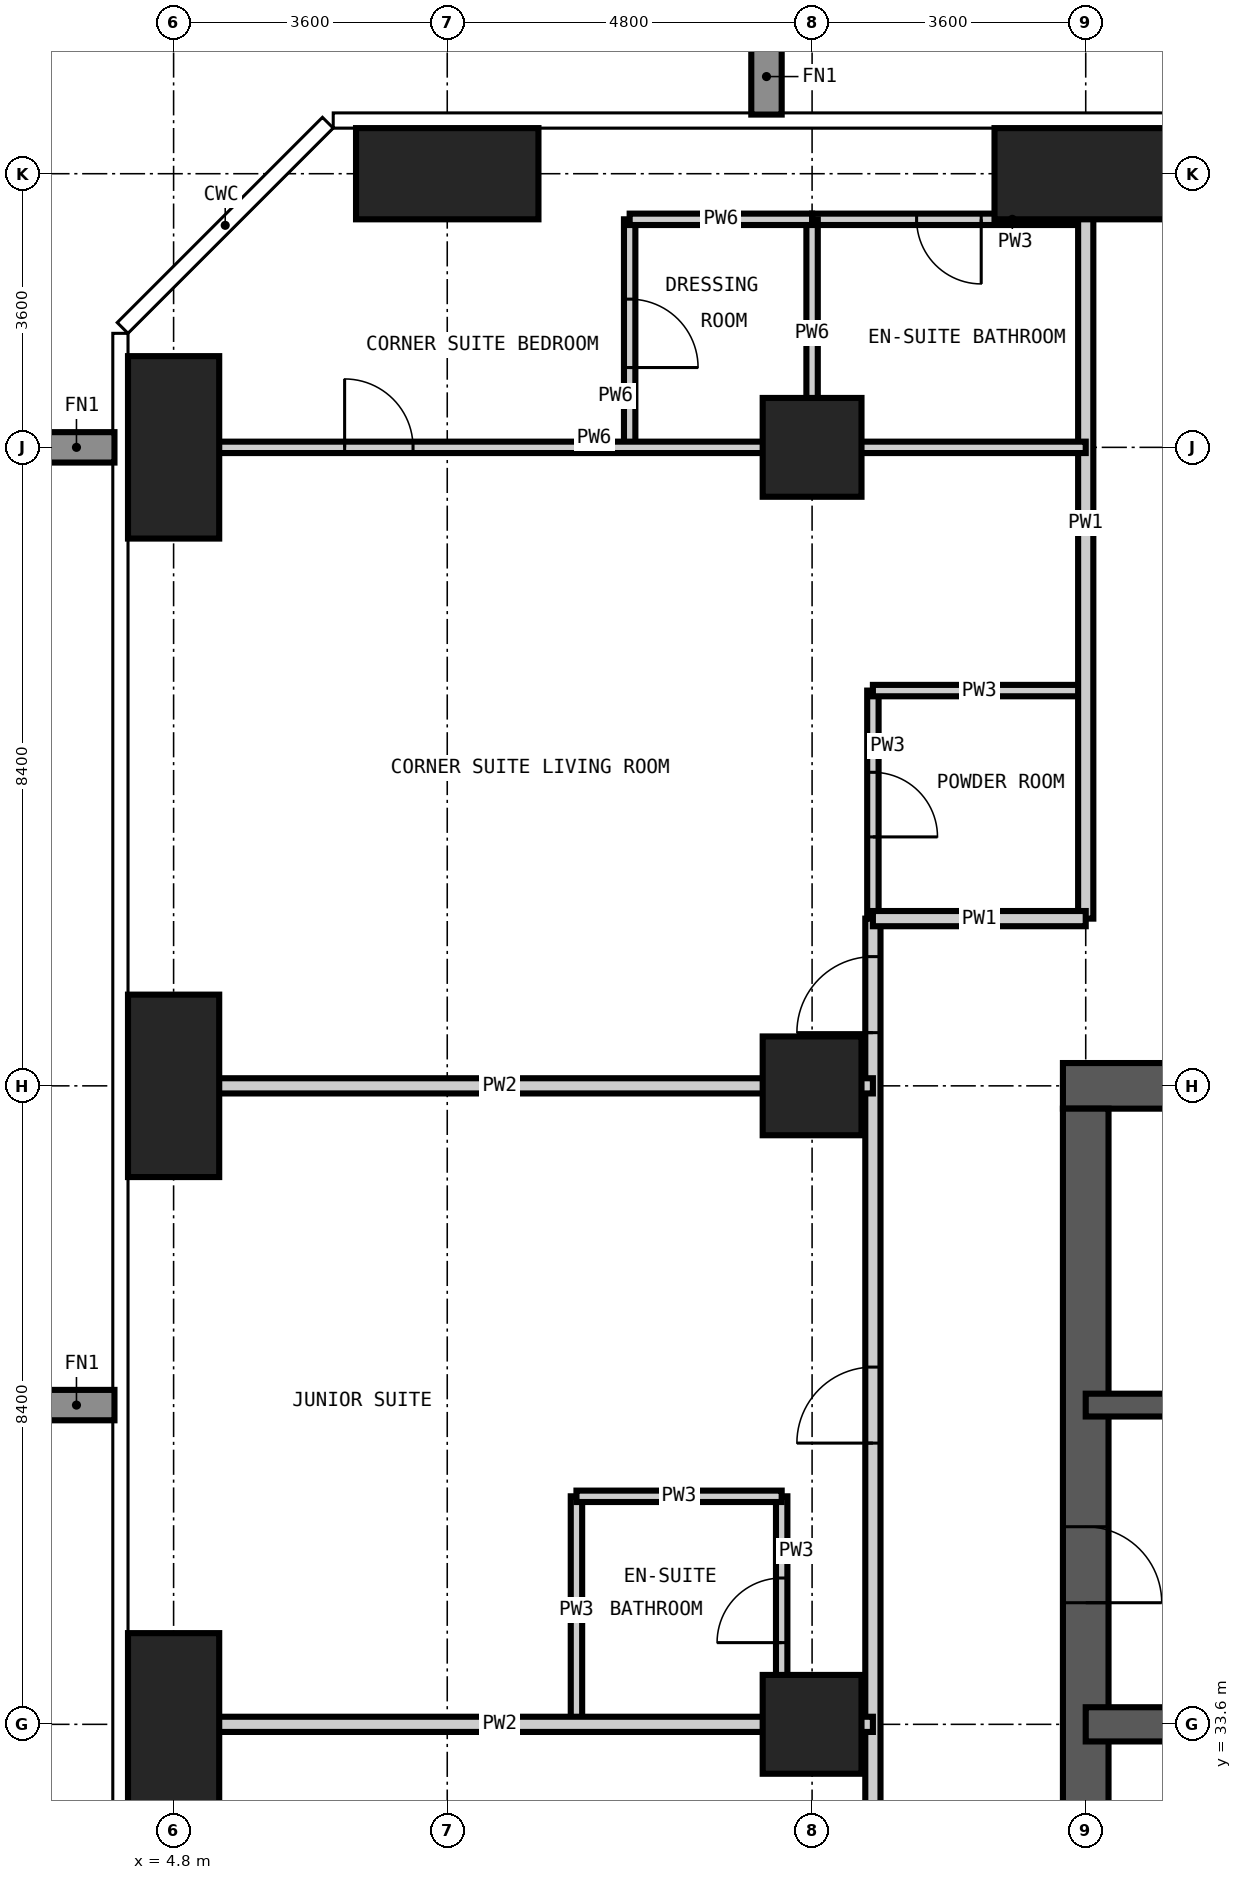
"""IFC4 building model, lengths in metres.
Left out: names, types, materials, properties, quantities, classifications, styles, units other than length and angle.
Written with IfcOpenShell. Run it as: python <this file> out.ifc"""

import sys

from ifc_helpers import new_model, si_unit, direction, frame, frame_2d, origin, origin_2d, place, context, subcontext, project, spatial, rectangle, extrude, element, fill, save


model = new_model("IFC4")
c1 = context("Model", 3, precision=1e-05, world=origin(), true_north=direction((0.0, 1.0)))
c2 = subcontext(c1, "Body", "Model", "MODEL_VIEW")
j1 = project(units=[si_unit("LENGTHUNIT", "METRE"), si_unit("PLANEANGLEUNIT", "RADIAN")], contexts=[c1])
p1 = place(None, origin())
s1 = spatial("IfcSite", under=j1, at=p1, CompositionType="ELEMENT")
p2 = place(p1, origin())
s2 = spatial("IfcBuilding", under=s1, at=p2, CompositionType="ELEMENT")
p3 = place(p2, frame((0.0, 0.0, 187.8)))
s3 = spatial("IfcBuildingStorey", under=s2, at=p3, CompositionType="ELEMENT", Elevation=187.8)
for number, where, z_axis, x_axis in (
    (1, (4.8, 33.6, -0.35), (0.0, 0.0, 1.0), (1.0, 0.0, 0.0)),
    (2, (4.8, 42.0, -0.35), (0.0, 0.0, 1.0), (1.0, 0.0, 0.0)),
    (3, (4.8, 50.4, -0.35), (0.0, 0.0, 1.0), (1.0, 0.0, 0.0)),
):
    element("IfcColumn", number, at=place(p3, frame(where, z_axis=z_axis, x_axis=x_axis)), inside=s3, PredefinedType="COLUMN", context=c2, shape_type="SweptSolid", body=[
        extrude(rectangle(XDim=1.2, YDim=2.4, at=origin_2d()), origin(), (0.0, 0.0, 1.0), 3.6),
    ])
p4 = place(p3, frame((8.4, 54.0, -0.35), z_axis=(0.0, 0.0, 1.0), x_axis=(1.0, 0.0, 0.0)))
e4 = element("IfcColumn", 4, at=p4, inside=s3, PredefinedType="COLUMN", context=c2, shape_type="SweptSolid", body=[
    extrude(rectangle(XDim=2.4, YDim=1.2, at=origin_2d()), origin(), (0.0, 0.0, 1.0), 3.6),
])
for number, where, z_axis, x_axis in (
    (5, (13.2, 33.6, -0.35), (0.0, 0.0, 1.0), (1.0, 0.0, 0.0)),
    (6, (13.2, 42.0, -0.35), (0.0, 0.0, 1.0), (1.0, 0.0, 0.0)),
    (7, (13.2, 50.4, -0.35), (0.0, 0.0, 1.0), (1.0, 0.0, 0.0)),
):
    element("IfcColumn", number, at=place(p3, frame(where, z_axis=z_axis, x_axis=x_axis)), inside=s3, PredefinedType="COLUMN", context=c2, shape_type="SweptSolid", body=[
        extrude(rectangle(XDim=1.3, YDim=1.3, at=origin_2d()), origin(), (0.0, 0.0, 1.0), 3.6),
    ])
p5 = place(p3, frame((16.8, 54.0, -0.35), z_axis=(0.0, 0.0, 1.0), x_axis=(1.0, 0.0, 0.0)))
e8 = element("IfcColumn", 8, at=p5, inside=s3, PredefinedType="COLUMN", context=c2, shape_type="SweptSolid", body=[
    extrude(rectangle(XDim=2.4, YDim=1.2, at=origin_2d()), origin(), (0.0, 0.0, 1.0), 3.6),
])
p6 = place(p3, frame((42.3, 42.0, -0.35), z_axis=(0.0, 0.0, 1.0), x_axis=(-1.0, 0.0, 0.0)))
e9 = element("IfcWall", 9, at=p6, inside=s3, PredefinedType="SHEAR", context=c2, shape_type="SweptSolid", body=[
    extrude(rectangle(XDim=25.8, YDim=0.6, at=frame_2d((12.9, 0.0))), origin(), (0.0, 0.0, 1.0), 3.6),
])
p7 = place(p6, frame((20.8, 0.0, 0.35)))
e10 = element("IfcOpeningElement", 10, at=p7, cuts=e9, PredefinedType="OPENING", context=c2, shape_type="SweptSolid", body=[
    extrude(rectangle(XDim=1.0, YDim=2.1, at=frame_2d((0.5, 1.05))), frame((0.0, 0.31, 0.0), z_axis=(0.0, -1.0, 0.0), x_axis=(1.0, 0.0, 0.0)), (0.0, 0.0, 1.0), 0.62),
])
p8 = place(p6, frame((10.2, 0.0, 0.35)))
e11 = element("IfcOpeningElement", 11, at=p8, cuts=e9, PredefinedType="OPENING", context=c2, shape_type="SweptSolid", body=[
    extrude(rectangle(XDim=1.2, YDim=2.2, at=frame_2d((0.6, 1.1))), frame((0.0, 0.31, 0.0), z_axis=(0.0, -1.0, 0.0), x_axis=(1.0, 0.0, 0.0)), (0.0, 0.0, 1.0), 0.62),
])
p9 = place(p3, frame((16.8, 41.7, -0.35), z_axis=(0.0, 0.0, 1.0), x_axis=(0.0, -1.0, 0.0)))
e12 = element("IfcWall", 12, at=p9, inside=s3, PredefinedType="SHEAR", context=c2, shape_type="SweptSolid", body=[
    extrude(rectangle(XDim=24.6, YDim=0.6, at=frame_2d((12.3, 0.0))), origin(), (0.0, 0.0, 1.0), 3.6),
])
p10 = place(p9, frame((11.4, 0.0, 0.35)))
e13 = element("IfcOpeningElement", 13, at=p10, cuts=e12, PredefinedType="OPENING", context=c2, shape_type="SweptSolid", body=[
    extrude(rectangle(XDim=1.8, YDim=2.2, at=frame_2d((0.9, 1.1))), frame((0.0, 0.31, 0.0), z_axis=(0.0, -1.0, 0.0), x_axis=(1.0, 0.0, 0.0)), (0.0, 0.0, 1.0), 0.62),
])
p11 = place(p9, frame((20.2, 0.0, 0.35)))
e14 = element("IfcOpeningElement", 14, at=p11, cuts=e12, PredefinedType="OPENING", context=c2, shape_type="SweptSolid", body=[
    extrude(rectangle(XDim=1.0, YDim=2.1, at=frame_2d((0.5, 1.05))), frame((0.0, 0.31, 0.0), z_axis=(0.0, -1.0, 0.0), x_axis=(1.0, 0.0, 0.0)), (0.0, 0.0, 1.0), 0.62),
])
p12 = place(p9, frame((5.5, 0.0, 0.35)))
e15 = element("IfcOpeningElement", 15, at=p12, cuts=e12, PredefinedType="OPENING", context=c2, shape_type="SweptSolid", body=[
    extrude(rectangle(XDim=1.0, YDim=2.1, at=frame_2d((0.5, 1.05))), frame((0.0, 0.31, 0.0), z_axis=(0.0, -1.0, 0.0), x_axis=(1.0, 0.0, 0.0)), (0.0, 0.0, 1.0), 0.62),
])
p13 = place(p3, frame((16.8, 37.8, -0.35), z_axis=(0.0, 0.0, 1.0), x_axis=(1.0, 0.0, 0.0)))
e16 = element("IfcWall", 16, at=p13, inside=s3, PredefinedType="SHEAR", context=c2, shape_type="SweptSolid", body=[
    extrude(rectangle(XDim=8.4, YDim=0.3, at=frame_2d((4.2, 0.0))), origin(), (0.0, 0.0, 1.0), 3.6),
])
p14 = place(p3, frame((16.8, 33.6, -0.35), z_axis=(0.0, 0.0, 1.0), x_axis=(1.0, 0.0, 0.0)))
e17 = element("IfcWall", 17, at=p14, inside=s3, PredefinedType="SHEAR", context=c2, shape_type="SweptSolid", body=[
    extrude(rectangle(XDim=25.2, YDim=0.45, at=frame_2d((12.6, 0.0))), origin(), (0.0, 0.0, 1.0), 3.6),
])
p15 = place(p3, frame((10.1, 33.6, 0.0), z_axis=(0.0, 0.0, 1.0), x_axis=(0.0, 1.0, 0.0)))
e18 = element("IfcWall", 18, at=p15, inside=s3, PredefinedType="PARTITIONING", context=c2, shape_type="SweptSolid", body=[
    extrude(rectangle(XDim=3.0, YDim=0.15, at=frame_2d((1.5, 0.0))), origin(), (0.0, 0.0, 1.0), 3.25),
])
p16 = place(p3, frame((12.8, 33.6, 0.0), z_axis=(0.0, 0.0, 1.0), x_axis=(0.0, 1.0, 0.0)))
e19 = element("IfcWall", 19, at=p16, inside=s3, PredefinedType="PARTITIONING", context=c2, shape_type="SweptSolid", body=[
    extrude(rectangle(XDim=3.0, YDim=0.15, at=frame_2d((1.5, 0.0))), origin(), (0.0, 0.0, 1.0), 3.25),
])
p17 = place(p16, frame((1.075, 0.0, 0.0)))
e20 = element("IfcOpeningElement", 20, at=p17, cuts=e19, PredefinedType="OPENING", context=c2, shape_type="SweptSolid", body=[
    extrude(rectangle(XDim=0.85, YDim=2.1, at=frame_2d((0.425, 1.05))), frame((0.0, 0.085, 0.0), z_axis=(0.0, -1.0, 0.0), x_axis=(1.0, 0.0, 0.0)), (0.0, 0.0, 1.0), 0.17),
])
p18 = place(p3, frame((14.0, 44.2, 0.0), z_axis=(0.0, 0.0, 1.0), x_axis=(0.0, 1.0, 0.0)))
e21 = element("IfcWall", 21, at=p18, inside=s3, PredefinedType="PARTITIONING", context=c2, shape_type="SweptSolid", body=[
    extrude(rectangle(XDim=3.0, YDim=0.15, at=frame_2d((1.5, 0.0))), origin(), (0.0, 0.0, 1.0), 3.25),
])
p19 = place(p18, frame((1.075, 0.0, 0.0)))
e22 = element("IfcOpeningElement", 22, at=p19, cuts=e21, PredefinedType="OPENING", context=c2, shape_type="SweptSolid", body=[
    extrude(rectangle(XDim=0.85, YDim=2.1, at=frame_2d((0.425, 1.05))), frame((0.0, 0.085, 0.0), z_axis=(0.0, -1.0, 0.0), x_axis=(1.0, 0.0, 0.0)), (0.0, 0.0, 1.0), 0.17),
])
p20 = place(p3, frame((10.1, 36.6, 0.0), z_axis=(0.0, 0.0, 1.0), x_axis=(1.0, 0.0, 0.0)))
e23 = element("IfcWall", 23, at=p20, inside=s3, PredefinedType="PARTITIONING", context=c2, shape_type="SweptSolid", body=[
    extrude(rectangle(XDim=2.7, YDim=0.15, at=frame_2d((1.35, 0.0))), origin(), (0.0, 0.0, 1.0), 3.25),
])
p21 = place(p3, frame((14.0, 47.2, 0.0), z_axis=(0.0, 0.0, 1.0), x_axis=(1.0, 0.0, 0.0)))
e24 = element("IfcWall", 24, at=p21, inside=s3, PredefinedType="PARTITIONING", context=c2, shape_type="SweptSolid", body=[
    extrude(rectangle(XDim=2.8, YDim=0.15, at=frame_2d((1.4, 0.0))), origin(), (0.0, 0.0, 1.0), 3.25),
])
p22 = place(p3, frame((13.2, 53.4, 0.0), z_axis=(0.0, 0.0, 1.0), x_axis=(1.0, 0.0, 0.0)))
e25 = element("IfcWall", 25, at=p22, inside=s3, PredefinedType="PARTITIONING", context=c2, shape_type="SweptSolid", body=[
    extrude(rectangle(XDim=3.6, YDim=0.15, at=frame_2d((1.8, 0.0))), origin(), (0.0, 0.0, 1.0), 3.25),
])
p23 = place(p22, frame((1.375, 0.0, 0.0)))
e26 = element("IfcOpeningElement", 26, at=p23, cuts=e25, PredefinedType="OPENING", context=c2, shape_type="SweptSolid", body=[
    extrude(rectangle(XDim=0.85, YDim=2.1, at=frame_2d((0.425, 1.05))), frame((0.0, 0.085, 0.0), z_axis=(0.0, -1.0, 0.0), x_axis=(1.0, 0.0, 0.0)), (0.0, 0.0, 1.0), 0.17),
])
p24 = place(p3, frame((14.0, 14.0, 0.0), z_axis=(0.0, 0.0, 1.0), x_axis=(0.0, 1.0, 0.0)))
e27 = element("IfcWall", 27, at=p24, inside=s3, PredefinedType="PARTITIONING", context=c2, shape_type="SweptSolid", body=[
    extrude(rectangle(XDim=30.2, YDim=0.2, at=frame_2d((15.1, 0.0))), origin(), (0.0, 0.0, 1.0), 3.25),
])
p25 = place(p24, frame((6.5, 0.0, 0.0)))
e28 = element("IfcOpeningElement", 28, at=p25, cuts=e27, PredefinedType="OPENING", context=c2, shape_type="SweptSolid", body=[
    extrude(rectangle(XDim=1.0, YDim=2.2, at=frame_2d((0.5, 1.1))), frame((0.0, 0.11, 0.0), z_axis=(0.0, -1.0, 0.0), x_axis=(1.0, 0.0, 0.0)), (0.0, 0.0, 1.0), 0.22),
])
p26 = place(p24, frame((14.9, 0.0, 0.0)))
e29 = element("IfcOpeningElement", 29, at=p26, cuts=e27, PredefinedType="OPENING", context=c2, shape_type="SweptSolid", body=[
    extrude(rectangle(XDim=1.0, YDim=2.2, at=frame_2d((0.5, 1.1))), frame((0.0, 0.11, 0.0), z_axis=(0.0, -1.0, 0.0), x_axis=(1.0, 0.0, 0.0)), (0.0, 0.0, 1.0), 0.22),
])
p27 = place(p24, frame((23.3, 0.0, 0.0)))
e30 = element("IfcOpeningElement", 30, at=p27, cuts=e27, PredefinedType="OPENING", context=c2, shape_type="SweptSolid", body=[
    extrude(rectangle(XDim=1.0, YDim=2.2, at=frame_2d((0.5, 1.1))), frame((0.0, 0.11, 0.0), z_axis=(0.0, -1.0, 0.0), x_axis=(1.0, 0.0, 0.0)), (0.0, 0.0, 1.0), 0.22),
])
p28 = place(p24, frame((0.9, 0.0, 0.0)))
e31 = element("IfcOpeningElement", 31, at=p28, cuts=e27, PredefinedType="OPENING", context=c2, shape_type="SweptSolid", body=[
    extrude(rectangle(XDim=1.0, YDim=2.2, at=frame_2d((0.5, 1.1))), frame((0.0, 0.11, 0.0), z_axis=(0.0, -1.0, 0.0), x_axis=(1.0, 0.0, 0.0)), (0.0, 0.0, 1.0), 0.22),
])
p29 = place(p24, frame((28.7, 0.0, 0.0)))
e32 = element("IfcOpeningElement", 32, at=p29, cuts=e27, PredefinedType="OPENING", context=c2, shape_type="SweptSolid", body=[
    extrude(rectangle(XDim=1.0, YDim=2.2, at=frame_2d((0.5, 1.1))), frame((0.0, 0.11, 0.0), z_axis=(0.0, -1.0, 0.0), x_axis=(1.0, 0.0, 0.0)), (0.0, 0.0, 1.0), 0.22),
])
p30 = place(p3, frame((16.8, 44.2, 0.0), z_axis=(0.0, 0.0, 1.0), x_axis=(0.0, 1.0, 0.0)))
e33 = element("IfcWall", 33, at=p30, inside=s3, PredefinedType="PARTITIONING", context=c2, shape_type="SweptSolid", body=[
    extrude(rectangle(XDim=10.418, YDim=0.2, at=frame_2d((5.209, 0.0))), origin(), (0.0, 0.0, 1.0), 3.25),
])
p31 = place(p3, frame((14.0, 44.2, 0.0), z_axis=(0.0, 0.0, 1.0), x_axis=(1.0, 0.0, 0.0)))
e34 = element("IfcWall", 34, at=p31, inside=s3, PredefinedType="PARTITIONING", context=c2, shape_type="SweptSolid", body=[
    extrude(rectangle(XDim=2.8, YDim=0.2, at=frame_2d((1.4, 0.0))), origin(), (0.0, 0.0, 1.0), 3.25),
])
for number, where, z_axis, x_axis in (
    (35, (4.182, 33.6, 0.0), (0.0, 0.0, 1.0), (1.0, 0.0, 0.0)),
    (36, (4.182, 42.0, 0.0), (0.0, 0.0, 1.0), (1.0, 0.0, 0.0)),
):
    element("IfcWall", number, at=place(p3, frame(where, z_axis=z_axis, x_axis=x_axis)), inside=s3, PredefinedType="PARTITIONING", context=c2, shape_type="SweptSolid", body=[
        extrude(rectangle(XDim=9.818, YDim=0.2, at=frame_2d((4.909, 0.0))), origin(), (0.0, 0.0, 1.0), 3.25),
    ])
p32 = place(p3, frame((10.8, 50.4, 0.0), z_axis=(0.0, 0.0, 1.0), x_axis=(0.0, 1.0, 0.0)))
e37 = element("IfcWall", 37, at=p32, inside=s3, PredefinedType="PARTITIONING", context=c2, shape_type="SweptSolid", body=[
    extrude(rectangle(XDim=3.0, YDim=0.15, at=frame_2d((1.5, 0.0))), origin(), (0.0, 0.0, 1.0), 3.25),
])
p33 = place(p32, frame((1.05, 0.0, 0.0)))
e38 = element("IfcOpeningElement", 38, at=p33, cuts=e37, PredefinedType="OPENING", context=c2, shape_type="SweptSolid", body=[
    extrude(rectangle(XDim=0.9, YDim=2.1, at=frame_2d((0.45, 1.05))), frame((0.0, 0.085, 0.0), z_axis=(0.0, -1.0, 0.0), x_axis=(1.0, 0.0, 0.0)), (0.0, 0.0, 1.0), 0.17),
])
p34 = place(p3, frame((13.2, 50.4, 0.0), z_axis=(0.0, 0.0, 1.0), x_axis=(0.0, 1.0, 0.0)))
e39 = element("IfcWall", 39, at=p34, inside=s3, PredefinedType="PARTITIONING", context=c2, shape_type="SweptSolid", body=[
    extrude(rectangle(XDim=3.0, YDim=0.15, at=frame_2d((1.5, 0.0))), origin(), (0.0, 0.0, 1.0), 3.25),
])
p35 = place(p3, frame((4.182, 50.4, 0.0), z_axis=(0.0, 0.0, 1.0), x_axis=(1.0, 0.0, 0.0)))
e40 = element("IfcWall", 40, at=p35, inside=s3, PredefinedType="PARTITIONING", context=c2, shape_type="SweptSolid", body=[
    extrude(rectangle(XDim=12.618, YDim=0.15, at=frame_2d((6.309, 0.0))), origin(), (0.0, 0.0, 1.0), 3.25),
])
p36 = place(p35, frame((2.868, 0.0, 0.0)))
e41 = element("IfcOpeningElement", 41, at=p36, cuts=e40, PredefinedType="OPENING", context=c2, shape_type="SweptSolid", body=[
    extrude(rectangle(XDim=0.9, YDim=2.1, at=frame_2d((0.45, 1.05))), frame((0.0, 0.085, 0.0), z_axis=(0.0, -1.0, 0.0), x_axis=(1.0, 0.0, 0.0)), (0.0, 0.0, 1.0), 0.17),
])
p37 = place(p3, frame((10.8, 53.4, 0.0), z_axis=(0.0, 0.0, 1.0), x_axis=(1.0, 0.0, 0.0)))
e42 = element("IfcWall", 42, at=p37, inside=s3, PredefinedType="PARTITIONING", context=c2, shape_type="SweptSolid", body=[
    extrude(rectangle(XDim=2.4, YDim=0.15, at=frame_2d((1.2, 0.0))), origin(), (0.0, 0.0, 1.0), 3.25),
])
p38 = place(p27, origin())
e43 = element("IfcDoor", 43, at=p38, inside=s3, OperationType="SINGLE_SWING_LEFT", PredefinedType="DOOR", context=c2, shape_type="SweptSolid", body=[
    extrude(rectangle(XDim=1.0, YDim=2.2, at=frame_2d((0.5, 1.1))), frame((0.0, 0.025, 0.0), z_axis=(0.0, -1.0, 0.0), x_axis=(1.0, 0.0, 0.0)), (0.0, 0.0, 1.0), 0.05),
])
fill(e30, e43)
p39 = place(p17, origin())
e44 = element("IfcDoor", 44, at=p39, inside=s3, OperationType="SINGLE_SWING_LEFT", PredefinedType="DOOR", context=c2, shape_type="SweptSolid", body=[
    extrude(rectangle(XDim=0.85, YDim=2.1, at=frame_2d((0.425, 1.05))), frame((0.0, 0.025, 0.0), z_axis=(0.0, -1.0, 0.0), x_axis=(1.0, 0.0, 0.0)), (0.0, 0.0, 1.0), 0.05),
])
fill(e20, e44)
p40 = place(p29, origin())
e45 = element("IfcDoor", 45, at=p40, inside=s3, OperationType="SINGLE_SWING_LEFT", PredefinedType="DOOR", context=c2, shape_type="SweptSolid", body=[
    extrude(rectangle(XDim=1.0, YDim=2.2, at=frame_2d((0.5, 1.1))), frame((0.0, 0.025, 0.0), z_axis=(0.0, -1.0, 0.0), x_axis=(1.0, 0.0, 0.0)), (0.0, 0.0, 1.0), 0.05),
])
fill(e32, e45)
p41 = place(p19, frame((0.85, 0.0, 0.0), z_axis=(0.0, 0.0, 1.0), x_axis=(-1.0, 0.0, 0.0)))
e46 = element("IfcDoor", 46, at=p41, inside=s3, OperationType="SINGLE_SWING_RIGHT", PredefinedType="DOOR", context=c2, shape_type="SweptSolid", body=[
    extrude(rectangle(XDim=0.85, YDim=2.1, at=frame_2d((0.425, 1.05))), frame((0.0, 0.025, 0.0), z_axis=(0.0, -1.0, 0.0), x_axis=(1.0, 0.0, 0.0)), (0.0, 0.0, 1.0), 0.05),
])
fill(e22, e46)
p42 = place(p36, origin())
e47 = element("IfcDoor", 47, at=p42, inside=s3, OperationType="SINGLE_SWING_LEFT", PredefinedType="DOOR", context=c2, shape_type="SweptSolid", body=[
    extrude(rectangle(XDim=0.9, YDim=2.1, at=frame_2d((0.45, 1.05))), frame((0.0, 0.025, 0.0), z_axis=(0.0, -1.0, 0.0), x_axis=(1.0, 0.0, 0.0)), (0.0, 0.0, 1.0), 0.05),
])
fill(e41, e47)
p43 = place(p23, frame((0.85, 0.0, 0.0), z_axis=(0.0, 0.0, 1.0), x_axis=(-1.0, 0.0, 0.0)))
e48 = element("IfcDoor", 48, at=p43, inside=s3, OperationType="SINGLE_SWING_LEFT", PredefinedType="DOOR", context=c2, shape_type="SweptSolid", body=[
    extrude(rectangle(XDim=0.85, YDim=2.1, at=frame_2d((0.425, 1.05))), frame((0.0, 0.025, 0.0), z_axis=(0.0, -1.0, 0.0), x_axis=(1.0, 0.0, 0.0)), (0.0, 0.0, 1.0), 0.05),
])
fill(e26, e48)
p44 = place(p33, frame((0.9, 0.0, 0.0), z_axis=(0.0, 0.0, 1.0), x_axis=(-1.0, 0.0, 0.0)))
e49 = element("IfcDoor", 49, at=p44, inside=s3, OperationType="SINGLE_SWING_RIGHT", PredefinedType="DOOR", context=c2, shape_type="SweptSolid", body=[
    extrude(rectangle(XDim=0.9, YDim=2.1, at=frame_2d((0.45, 1.05))), frame((0.0, 0.025, 0.0), z_axis=(0.0, -1.0, 0.0), x_axis=(1.0, 0.0, 0.0)), (0.0, 0.0, 1.0), 0.05),
])
fill(e38, e49)
p45 = place(p12, origin())
e50 = element("IfcDoor", 50, at=p45, inside=s3, OperationType="SINGLE_SWING_RIGHT", PredefinedType="DOOR", context=c2, shape_type="SweptSolid", body=[
    extrude(rectangle(XDim=1.0, YDim=2.1, at=frame_2d((0.5, 1.05))), frame((0.0, 0.025, 0.0), z_axis=(0.0, -1.0, 0.0), x_axis=(1.0, 0.0, 0.0)), (0.0, 0.0, 1.0), 0.05),
])
fill(e15, e50)
save(model, sys.argv[1])
